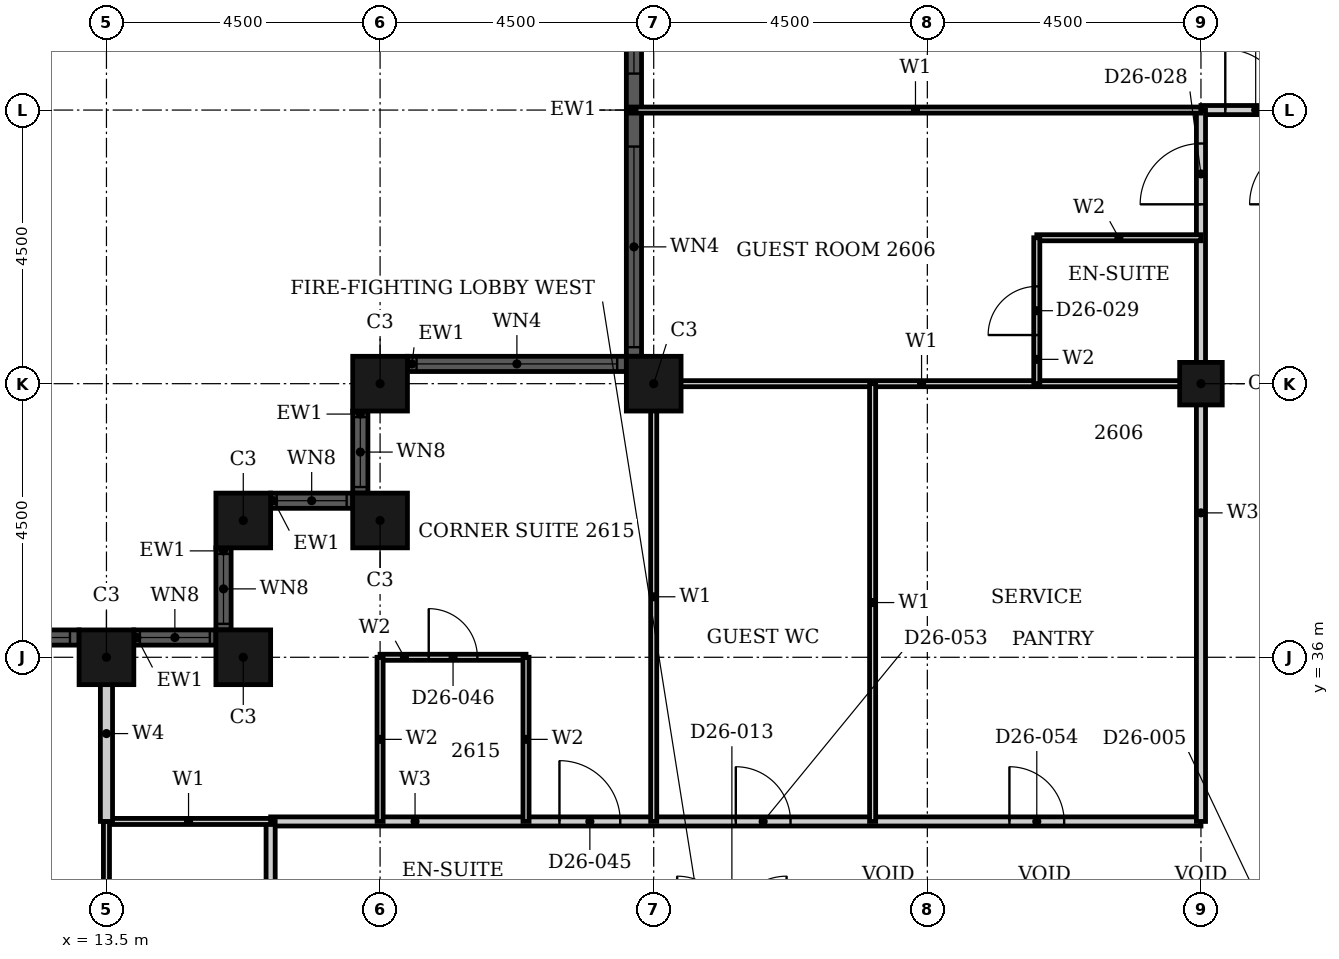
"""IFC4 building model, lengths in metres.
Left out: names, types, materials, properties, quantities, classifications, styles, units other than length and angle.
Written with IfcOpenShell. Run it as: python <this file> out.ifc"""

import sys

from ifc_helpers import new_model, si_unit, direction, frame, frame_2d, origin, origin_2d, place, context, subcontext, project, spatial, rectangle, hollow_rectangle, extrude, element, fill, save


model = new_model("IFC4")
c1 = context("Model", 3, precision=1e-05, world=origin(), true_north=direction((0.0, 1.0)))
c2 = subcontext(c1, "Body", "Model", "MODEL_VIEW")
j1 = project(units=[si_unit("LENGTHUNIT", "METRE"), si_unit("PLANEANGLEUNIT", "RADIAN")], contexts=[c1])
p1 = place(None, origin())
s1 = spatial("IfcSite", under=j1, at=p1, CompositionType="ELEMENT")
p2 = place(p1, origin())
s2 = spatial("IfcBuilding", under=s1, at=p2, CompositionType="ELEMENT")
p3 = place(p2, frame((0.0, 0.0, 108.0)))
s3 = spatial("IfcBuildingStorey", under=s2, at=p3, CompositionType="ELEMENT", Elevation=108.0)
for number, where, z_axis, x_axis in (
    (1, (22.5, 40.5, 0.0), (0.0, 0.0, 1.0), (1.0, 0.0, 0.0)),
    (2, (18.0, 40.5, 0.0), (0.0, 0.0, 1.0), (1.0, 0.0, 0.0)),
    (3, (18.0, 38.25, 0.0), (0.0, 0.0, 1.0), (1.0, 0.0, 0.0)),
    (4, (15.75, 38.25, 0.0), (0.0, 0.0, 1.0), (1.0, 0.0, 0.0)),
    (5, (15.75, 36.0, 0.0), (0.0, 0.0, 1.0), (1.0, 0.0, 0.0)),
    (6, (13.5, 36.0, 0.0), (0.0, 0.0, 1.0), (1.0, 0.0, 0.0)),
):
    element("IfcColumn", number, at=place(p3, frame(where, z_axis=z_axis, x_axis=x_axis)), inside=s3, PredefinedType="COLUMN", context=c2, shape_type="SweptSolid", body=[
        extrude(hollow_rectangle(XDim=0.9, YDim=0.9, WallThickness=0.028, at=origin_2d()), origin(), (0.0, 0.0, 1.0), 3.6),
    ])
p4 = place(p3, frame((31.5, 40.5, 0.0), z_axis=(0.0, 0.0, 1.0), x_axis=(1.0, 0.0, 0.0)))
e7 = element("IfcColumn", 7, at=p4, inside=s3, PredefinedType="COLUMN", context=c2, shape_type="SweptSolid", body=[
    extrude(hollow_rectangle(XDim=0.7, YDim=0.7, WallThickness=0.022, at=origin_2d()), origin(), (0.0, 0.0, 1.0), 3.6),
])
p5 = place(p3, frame((22.175, 49.05, 0.0), z_axis=(0.0, 0.0, 1.0), x_axis=(0.0, -1.0, 0.0)))
e8 = element("IfcWall", 8, at=p5, inside=s3, PredefinedType="SOLIDWALL", context=c2, shape_type="SweptSolid", body=[
    extrude(rectangle(XDim=8.1, YDim=0.25, at=frame_2d((4.05, 0.0))), origin(), (0.0, 0.0, 1.0), 3.6),
])
p6 = place(p5, frame((0.15, 0.0, 0.9)))
e9 = element("IfcOpeningElement", 9, at=p6, cuts=e8, PredefinedType="OPENING", context=c2, shape_type="SweptSolid", body=[
    extrude(rectangle(XDim=3.3, YDim=2.08, at=frame_2d((1.65, 1.04))), frame((0.0, 0.135, 0.0), z_axis=(0.0, -1.0, 0.0), x_axis=(1.0, 0.0, 0.0)), (0.0, 0.0, 1.0), 0.27),
])
p7 = place(p5, frame((4.65, 0.0, 0.9)))
e10 = element("IfcOpeningElement", 10, at=p7, cuts=e8, PredefinedType="OPENING", context=c2, shape_type="SweptSolid", body=[
    extrude(rectangle(XDim=3.3, YDim=2.08, at=frame_2d((1.65, 1.04))), frame((0.0, 0.135, 0.0), z_axis=(0.0, -1.0, 0.0), x_axis=(1.0, 0.0, 0.0)), (0.0, 0.0, 1.0), 0.27),
])
p8 = place(p3, frame((22.05, 40.825, 0.0), z_axis=(0.0, 0.0, 1.0), x_axis=(-1.0, 0.0, 0.0)))
e11 = element("IfcWall", 11, at=p8, inside=s3, PredefinedType="SOLIDWALL", context=c2, shape_type="SweptSolid", body=[
    extrude(rectangle(XDim=3.6, YDim=0.25, at=frame_2d((1.8, 0.0))), origin(), (0.0, 0.0, 1.0), 3.6),
])
p9 = place(p8, frame((0.15, 0.0, 0.9)))
e12 = element("IfcOpeningElement", 12, at=p9, cuts=e11, PredefinedType="OPENING", context=c2, shape_type="SweptSolid", body=[
    extrude(rectangle(XDim=3.3, YDim=2.08, at=frame_2d((1.65, 1.04))), frame((0.0, 0.135, 0.0), z_axis=(0.0, -1.0, 0.0), x_axis=(1.0, 0.0, 0.0)), (0.0, 0.0, 1.0), 0.27),
])
p10 = place(p3, frame((17.675, 40.05, 0.0), z_axis=(0.0, 0.0, 1.0), x_axis=(0.0, -1.0, 0.0)))
e13 = element("IfcWall", 13, at=p10, inside=s3, PredefinedType="SOLIDWALL", context=c2, shape_type="SweptSolid", body=[
    extrude(rectangle(XDim=1.35, YDim=0.25, at=frame_2d((0.675, 0.0))), origin(), (0.0, 0.0, 1.0), 3.6),
])
p11 = place(p10, frame((0.1, 0.0, 0.9)))
e14 = element("IfcOpeningElement", 14, at=p11, cuts=e13, PredefinedType="OPENING", context=c2, shape_type="SweptSolid", body=[
    extrude(rectangle(XDim=1.15, YDim=2.08, at=frame_2d((0.575, 1.04))), frame((0.0, 0.135, 0.0), z_axis=(0.0, -1.0, 0.0), x_axis=(1.0, 0.0, 0.0)), (0.0, 0.0, 1.0), 0.27),
])
p12 = place(p3, frame((17.55, 38.575, 0.0), z_axis=(0.0, 0.0, 1.0), x_axis=(-1.0, 0.0, 0.0)))
e15 = element("IfcWall", 15, at=p12, inside=s3, PredefinedType="SOLIDWALL", context=c2, shape_type="SweptSolid", body=[
    extrude(rectangle(XDim=1.35, YDim=0.25, at=frame_2d((0.675, 0.0))), origin(), (0.0, 0.0, 1.0), 3.6),
])
p13 = place(p12, frame((0.1, 0.0, 0.9)))
e16 = element("IfcOpeningElement", 16, at=p13, cuts=e15, PredefinedType="OPENING", context=c2, shape_type="SweptSolid", body=[
    extrude(rectangle(XDim=1.15, YDim=2.08, at=frame_2d((0.575, 1.04))), frame((0.0, 0.135, 0.0), z_axis=(0.0, -1.0, 0.0), x_axis=(1.0, 0.0, 0.0)), (0.0, 0.0, 1.0), 0.27),
])
p14 = place(p3, frame((15.425, 37.8, 0.0), z_axis=(0.0, 0.0, 1.0), x_axis=(0.0, -1.0, 0.0)))
e17 = element("IfcWall", 17, at=p14, inside=s3, PredefinedType="SOLIDWALL", context=c2, shape_type="SweptSolid", body=[
    extrude(rectangle(XDim=1.35, YDim=0.25, at=frame_2d((0.675, 0.0))), origin(), (0.0, 0.0, 1.0), 3.6),
])
p15 = place(p14, frame((0.1, 0.0, 0.9)))
e18 = element("IfcOpeningElement", 18, at=p15, cuts=e17, PredefinedType="OPENING", context=c2, shape_type="SweptSolid", body=[
    extrude(rectangle(XDim=1.15, YDim=2.08, at=frame_2d((0.575, 1.04))), frame((0.0, 0.135, 0.0), z_axis=(0.0, -1.0, 0.0), x_axis=(1.0, 0.0, 0.0)), (0.0, 0.0, 1.0), 0.27),
])
p16 = place(p3, frame((15.3, 36.325, 0.0), z_axis=(0.0, 0.0, 1.0), x_axis=(-1.0, 0.0, 0.0)))
e19 = element("IfcWall", 19, at=p16, inside=s3, PredefinedType="SOLIDWALL", context=c2, shape_type="SweptSolid", body=[
    extrude(rectangle(XDim=1.35, YDim=0.25, at=frame_2d((0.675, 0.0))), origin(), (0.0, 0.0, 1.0), 3.6),
])
p17 = place(p16, frame((0.1, 0.0, 0.9)))
e20 = element("IfcOpeningElement", 20, at=p17, cuts=e19, PredefinedType="OPENING", context=c2, shape_type="SweptSolid", body=[
    extrude(rectangle(XDim=1.15, YDim=2.08, at=frame_2d((0.575, 1.04))), frame((0.0, 0.135, 0.0), z_axis=(0.0, -1.0, 0.0), x_axis=(1.0, 0.0, 0.0)), (0.0, 0.0, 1.0), 0.27),
])
p18 = place(p3, frame((13.05, 36.325, 0.0), z_axis=(0.0, 0.0, 1.0), x_axis=(-1.0, 0.0, 0.0)))
e21 = element("IfcWall", 21, at=p18, inside=s3, PredefinedType="SOLIDWALL", context=c2, shape_type="SweptSolid", body=[
    extrude(rectangle(XDim=8.1, YDim=0.25, at=frame_2d((4.05, 0.0))), origin(), (0.0, 0.0, 1.0), 3.6),
])
p19 = place(p18, frame((0.15, 0.0, 0.9)))
e22 = element("IfcOpeningElement", 22, at=p19, cuts=e21, PredefinedType="OPENING", context=c2, shape_type="SweptSolid", body=[
    extrude(rectangle(XDim=3.3, YDim=2.08, at=frame_2d((1.65, 1.04))), frame((0.0, 0.135, 0.0), z_axis=(0.0, -1.0, 0.0), x_axis=(1.0, 0.0, 0.0)), (0.0, 0.0, 1.0), 0.27),
])
p20 = place(p18, frame((4.65, 0.0, 0.9)))
e23 = element("IfcOpeningElement", 23, at=p20, cuts=e21, PredefinedType="OPENING", context=c2, shape_type="SweptSolid", body=[
    extrude(rectangle(XDim=3.3, YDim=2.08, at=frame_2d((1.65, 1.04))), frame((0.0, 0.135, 0.0), z_axis=(0.0, -1.0, 0.0), x_axis=(1.0, 0.0, 0.0)), (0.0, 0.0, 1.0), 0.27),
])
p21 = place(p3, frame((16.2, 33.3, 0.0), z_axis=(0.0, 0.0, 1.0), x_axis=(1.0, 0.0, 0.0)))
e24 = element("IfcWall", 24, at=p21, inside=s3, PredefinedType="PARTITIONING", context=c2, shape_type="SweptSolid", body=[
    extrude(rectangle(XDim=15.3, YDim=0.15, at=frame_2d((7.65, 0.0))), origin(), (0.0, 0.0, 1.0), 3.3),
])
p22 = place(p21, frame((4.75, 0.0, 0.0)))
e25 = element("IfcOpeningElement", 25, at=p22, cuts=e24, PredefinedType="OPENING", context=c2, shape_type="SweptSolid", body=[
    extrude(rectangle(XDim=1.0, YDim=2.1, at=frame_2d((0.5, 1.05))), frame((0.0, 0.085, 0.0), z_axis=(0.0, -1.0, 0.0), x_axis=(1.0, 0.0, 0.0)), (0.0, 0.0, 1.0), 0.17),
])
p23 = place(p21, frame((7.65, 0.0, 0.0)))
e26 = element("IfcOpeningElement", 26, at=p23, cuts=e24, PredefinedType="OPENING", context=c2, shape_type="SweptSolid", body=[
    extrude(rectangle(XDim=0.9, YDim=2.1, at=frame_2d((0.45, 1.05))), frame((0.0, 0.085, 0.0), z_axis=(0.0, -1.0, 0.0), x_axis=(1.0, 0.0, 0.0)), (0.0, 0.0, 1.0), 0.17),
])
p24 = place(p21, frame((12.15, 0.0, 0.0)))
e27 = element("IfcOpeningElement", 27, at=p24, cuts=e24, PredefinedType="OPENING", context=c2, shape_type="SweptSolid", body=[
    extrude(rectangle(XDim=0.9, YDim=2.1, at=frame_2d((0.45, 1.05))), frame((0.0, 0.085, 0.0), z_axis=(0.0, -1.0, 0.0), x_axis=(1.0, 0.0, 0.0)), (0.0, 0.0, 1.0), 0.17),
])
p25 = place(p3, frame((31.5, 45.0, 0.0), z_axis=(0.0, 0.0, 1.0), x_axis=(1.0, 0.0, 0.0)))
e28 = element("IfcWall", 28, at=p25, inside=s3, PredefinedType="PARTITIONING", context=c2, shape_type="SweptSolid", body=[
    extrude(rectangle(XDim=1.8, YDim=0.15, at=frame_2d((0.9, 0.0))), origin(), (0.0, 0.0, 1.0), 3.3),
])
p26 = place(p25, frame((0.4, 0.0, 0.0)))
e29 = element("IfcOpeningElement", 29, at=p26, cuts=e28, PredefinedType="OPENING", context=c2, shape_type="SweptSolid", body=[
    extrude(rectangle(XDim=1.0, YDim=2.1, at=frame_2d((0.5, 1.05))), frame((0.0, 0.085, 0.0), z_axis=(0.0, -1.0, 0.0), x_axis=(1.0, 0.0, 0.0)), (0.0, 0.0, 1.0), 0.17),
])
p27 = place(p3, frame((16.2, 27.0, 0.0), z_axis=(0.0, 0.0, 1.0), x_axis=(0.0, 1.0, 0.0)))
e30 = element("IfcWall", 30, at=p27, inside=s3, PredefinedType="PARTITIONING", context=c2, shape_type="SweptSolid", body=[
    extrude(rectangle(XDim=6.3, YDim=0.15, at=frame_2d((3.15, 0.0))), origin(), (0.0, 0.0, 1.0), 3.3),
])
p28 = place(p27, frame((2.55, 0.0, 0.0)))
e31 = element("IfcOpeningElement", 31, at=p28, cuts=e30, PredefinedType="OPENING", context=c2, shape_type="SweptSolid", body=[
    extrude(rectangle(XDim=0.9, YDim=2.1, at=frame_2d((0.45, 1.05))), frame((0.0, 0.085, 0.0), z_axis=(0.0, -1.0, 0.0), x_axis=(1.0, 0.0, 0.0)), (0.0, 0.0, 1.0), 0.17),
])
p29 = place(p3, frame((31.5, 33.3, 0.0), z_axis=(0.0, 0.0, 1.0), x_axis=(0.0, 1.0, 0.0)))
e32 = element("IfcWall", 32, at=p29, inside=s3, PredefinedType="PARTITIONING", context=c2, shape_type="SweptSolid", body=[
    extrude(rectangle(XDim=11.7, YDim=0.15, at=frame_2d((5.85, 0.0))), origin(), (0.0, 0.0, 1.0), 2.58),
])
p30 = place(p29, frame((10.15, 0.0, 0.0)))
e33 = element("IfcOpeningElement", 33, at=p30, cuts=e32, PredefinedType="OPENING", context=c2, shape_type="SweptSolid", body=[
    extrude(rectangle(XDim=1.0, YDim=2.1, at=frame_2d((0.5, 1.05))), frame((0.0, 0.085, 0.0), z_axis=(0.0, -1.0, 0.0), x_axis=(1.0, 0.0, 0.0)), (0.0, 0.0, 1.0), 0.17),
])
p31 = place(p3, frame((13.5, 33.3, 0.0), z_axis=(0.0, 0.0, 1.0), x_axis=(1.0, 0.0, 0.0)))
e34 = element("IfcWall", 34, at=p31, inside=s3, PredefinedType="PARTITIONING", context=c2, shape_type="SweptSolid", body=[
    extrude(rectangle(XDim=2.7, YDim=0.1, at=frame_2d((1.35, 0.0))), origin(), (0.0, 0.0, 1.0), 3.3),
])
p32 = place(p3, frame((22.31, 40.5, 0.0), z_axis=(0.0, 0.0, 1.0), x_axis=(1.0, 0.0, 0.0)))
e35 = element("IfcWall", 35, at=p32, inside=s3, PredefinedType="PARTITIONING", context=c2, shape_type="SweptSolid", body=[
    extrude(rectangle(XDim=9.19, YDim=0.1, at=frame_2d((4.595, 0.0))), origin(), (0.0, 0.0, 1.0), 2.38),
])
p33 = place(p3, frame((22.11, 45.0, 0.0), z_axis=(0.0, 0.0, 1.0), x_axis=(1.0, 0.0, 0.0)))
e36 = element("IfcWall", 36, at=p33, inside=s3, PredefinedType="PARTITIONING", context=c2, shape_type="SweptSolid", body=[
    extrude(rectangle(XDim=9.39, YDim=0.1, at=frame_2d((4.695, 0.0))), origin(), (0.0, 0.0, 1.0), 3.3),
])
p34 = place(p3, frame((13.5, 27.0, 0.0), z_axis=(0.0, 0.0, 1.0), x_axis=(0.0, 1.0, 0.0)))
e37 = element("IfcWall", 37, at=p34, inside=s3, PredefinedType="PARTITIONING", context=c2, shape_type="SweptSolid", body=[
    extrude(rectangle(XDim=6.3, YDim=0.1, at=frame_2d((3.15, 0.0))), origin(), (0.0, 0.0, 1.0), 2.38),
])
p35 = place(p3, frame((22.5, 33.3, 0.0), z_axis=(0.0, 0.0, 1.0), x_axis=(0.0, 1.0, 0.0)))
e38 = element("IfcWall", 38, at=p35, inside=s3, PredefinedType="PARTITIONING", context=c2, shape_type="SweptSolid", body=[
    extrude(rectangle(XDim=7.39, YDim=0.1, at=frame_2d((3.695, 0.0))), origin(), (0.0, 0.0, 1.0), 3.3),
])
p36 = place(p3, frame((26.1, 33.3, 0.0), z_axis=(0.0, 0.0, 1.0), x_axis=(0.0, 1.0, 0.0)))
e39 = element("IfcWall", 39, at=p36, inside=s3, PredefinedType="PARTITIONING", context=c2, shape_type="SweptSolid", body=[
    extrude(rectangle(XDim=7.2, YDim=0.1, at=frame_2d((3.6, 0.0))), origin(), (0.0, 0.0, 1.0), 3.3),
])
p37 = place(p3, frame((13.5, 33.3, 0.0), z_axis=(0.0, 0.0, 1.0), x_axis=(0.0, 1.0, 0.0)))
e40 = element("IfcWall", 40, at=p37, inside=s3, PredefinedType="PARTITIONING", context=c2, shape_type="SweptSolid", body=[
    extrude(rectangle(XDim=2.89, YDim=0.2, at=frame_2d((1.445, 0.0))), origin(), (0.0, 0.0, 1.0), 2.38),
])
p38 = place(p3, frame((18.0, 36.0, 0.0), z_axis=(0.0, 0.0, 1.0), x_axis=(1.0, 0.0, 0.0)))
e41 = element("IfcWall", 41, at=p38, inside=s3, PredefinedType="PARTITIONING", context=c2, shape_type="SweptSolid", body=[
    extrude(rectangle(XDim=2.4, YDim=0.1, at=frame_2d((1.2, 0.0))), origin(), (0.0, 0.0, 1.0), 3.3),
])
p39 = place(p38, frame((0.8, 0.0, 0.0)))
e42 = element("IfcOpeningElement", 42, at=p39, cuts=e41, PredefinedType="OPENING", context=c2, shape_type="SweptSolid", body=[
    extrude(rectangle(XDim=0.8, YDim=2.1, at=frame_2d((0.4, 1.05))), frame((0.0, 0.06, 0.0), z_axis=(0.0, -1.0, 0.0), x_axis=(1.0, 0.0, 0.0)), (0.0, 0.0, 1.0), 0.12),
])
for number, where, z_axis, x_axis in (
    (43, (28.8, 42.9, 0.0), (0.0, 0.0, 1.0), (1.0, 0.0, 0.0)),
    (44, (18.0, 33.3, 0.0), (0.0, 0.0, 1.0), (0.0, 1.0, 0.0)),
    (45, (20.4, 33.3, 0.0), (0.0, 0.0, 1.0), (0.0, 1.0, 0.0)),
):
    element("IfcWall", number, at=place(p3, frame(where, z_axis=z_axis, x_axis=x_axis)), inside=s3, PredefinedType="PARTITIONING", context=c2, shape_type="SweptSolid", body=[
        extrude(rectangle(XDim=2.7, YDim=0.1, at=frame_2d((1.35, 0.0))), origin(), (0.0, 0.0, 1.0), 3.3),
    ])
p40 = place(p3, frame((28.8, 40.5, 0.0), z_axis=(0.0, 0.0, 1.0), x_axis=(0.0, 1.0, 0.0)))
e46 = element("IfcWall", 46, at=p40, inside=s3, PredefinedType="PARTITIONING", context=c2, shape_type="SweptSolid", body=[
    extrude(rectangle(XDim=2.4, YDim=0.1, at=frame_2d((1.2, 0.0))), origin(), (0.0, 0.0, 1.0), 3.3),
])
p41 = place(p40, frame((0.8, 0.0, 0.0)))
e47 = element("IfcOpeningElement", 47, at=p41, cuts=e46, PredefinedType="OPENING", context=c2, shape_type="SweptSolid", body=[
    extrude(rectangle(XDim=0.8, YDim=2.1, at=frame_2d((0.4, 1.05))), frame((0.0, 0.06, 0.0), z_axis=(0.0, -1.0, 0.0), x_axis=(1.0, 0.0, 0.0)), (0.0, 0.0, 1.0), 0.12),
])
p42 = place(p6, origin())
e48 = element("IfcWindow", 48, at=p42, inside=s3, PartitioningType="SINGLE_PANEL", PredefinedType="WINDOW", context=c2, shape_type="SweptSolid", body=[
    extrude(rectangle(XDim=3.3, YDim=2.08, at=frame_2d((1.65, 1.04))), frame((0.0, 0.03, 0.0), z_axis=(0.0, -1.0, 0.0), x_axis=(1.0, 0.0, 0.0)), (0.0, 0.0, 1.0), 0.06),
])
fill(e9, e48)
p43 = place(p7, origin())
e49 = element("IfcWindow", 49, at=p43, inside=s3, PartitioningType="SINGLE_PANEL", PredefinedType="WINDOW", context=c2, shape_type="SweptSolid", body=[
    extrude(rectangle(XDim=3.3, YDim=2.08, at=frame_2d((1.65, 1.04))), frame((0.0, 0.03, 0.0), z_axis=(0.0, -1.0, 0.0), x_axis=(1.0, 0.0, 0.0)), (0.0, 0.0, 1.0), 0.06),
])
fill(e10, e49)
p44 = place(p9, origin())
e50 = element("IfcWindow", 50, at=p44, inside=s3, PartitioningType="SINGLE_PANEL", PredefinedType="WINDOW", context=c2, shape_type="SweptSolid", body=[
    extrude(rectangle(XDim=3.3, YDim=2.08, at=frame_2d((1.65, 1.04))), frame((0.0, 0.03, 0.0), z_axis=(0.0, -1.0, 0.0), x_axis=(1.0, 0.0, 0.0)), (0.0, 0.0, 1.0), 0.06),
])
fill(e12, e50)
p45 = place(p11, origin())
e51 = element("IfcWindow", 51, at=p45, inside=s3, PartitioningType="SINGLE_PANEL", PredefinedType="WINDOW", context=c2, shape_type="SweptSolid", body=[
    extrude(rectangle(XDim=1.15, YDim=2.08, at=frame_2d((0.575, 1.04))), frame((0.0, 0.03, 0.0), z_axis=(0.0, -1.0, 0.0), x_axis=(1.0, 0.0, 0.0)), (0.0, 0.0, 1.0), 0.06),
])
fill(e14, e51)
p46 = place(p13, origin())
e52 = element("IfcWindow", 52, at=p46, inside=s3, PartitioningType="SINGLE_PANEL", PredefinedType="WINDOW", context=c2, shape_type="SweptSolid", body=[
    extrude(rectangle(XDim=1.15, YDim=2.08, at=frame_2d((0.575, 1.04))), frame((0.0, 0.03, 0.0), z_axis=(0.0, -1.0, 0.0), x_axis=(1.0, 0.0, 0.0)), (0.0, 0.0, 1.0), 0.06),
])
fill(e16, e52)
p47 = place(p15, origin())
e53 = element("IfcWindow", 53, at=p47, inside=s3, PartitioningType="SINGLE_PANEL", PredefinedType="WINDOW", context=c2, shape_type="SweptSolid", body=[
    extrude(rectangle(XDim=1.15, YDim=2.08, at=frame_2d((0.575, 1.04))), frame((0.0, 0.03, 0.0), z_axis=(0.0, -1.0, 0.0), x_axis=(1.0, 0.0, 0.0)), (0.0, 0.0, 1.0), 0.06),
])
fill(e18, e53)
p48 = place(p17, origin())
e54 = element("IfcWindow", 54, at=p48, inside=s3, PartitioningType="SINGLE_PANEL", PredefinedType="WINDOW", context=c2, shape_type="SweptSolid", body=[
    extrude(rectangle(XDim=1.15, YDim=2.08, at=frame_2d((0.575, 1.04))), frame((0.0, 0.03, 0.0), z_axis=(0.0, -1.0, 0.0), x_axis=(1.0, 0.0, 0.0)), (0.0, 0.0, 1.0), 0.06),
])
fill(e20, e54)
p49 = place(p19, origin())
e55 = element("IfcWindow", 55, at=p49, inside=s3, PartitioningType="SINGLE_PANEL", PredefinedType="WINDOW", context=c2, shape_type="SweptSolid", body=[
    extrude(rectangle(XDim=3.3, YDim=2.08, at=frame_2d((1.65, 1.04))), frame((0.0, 0.03, 0.0), z_axis=(0.0, -1.0, 0.0), x_axis=(1.0, 0.0, 0.0)), (0.0, 0.0, 1.0), 0.06),
])
fill(e22, e55)
p50 = place(p30, origin())
e56 = element("IfcDoor", 56, at=p50, inside=s3, OperationType="SINGLE_SWING_RIGHT", PredefinedType="DOOR", context=c2, shape_type="SweptSolid", body=[
    extrude(rectangle(XDim=1.0, YDim=2.1, at=frame_2d((0.5, 1.05))), frame((0.0, 0.025, 0.0), z_axis=(0.0, -1.0, 0.0), x_axis=(1.0, 0.0, 0.0)), (0.0, 0.0, 1.0), 0.05),
])
fill(e33, e56)
p51 = place(p41, origin())
e57 = element("IfcDoor", 57, at=p51, inside=s3, OperationType="SINGLE_SWING_LEFT", PredefinedType="DOOR", context=c2, shape_type="SweptSolid", body=[
    extrude(rectangle(XDim=0.8, YDim=2.1, at=frame_2d((0.4, 1.05))), frame((0.0, 0.025, 0.0), z_axis=(0.0, -1.0, 0.0), x_axis=(1.0, 0.0, 0.0)), (0.0, 0.0, 1.0), 0.05),
])
fill(e47, e57)
p52 = place(p26, origin())
e58 = element("IfcDoor", 58, at=p52, inside=s3, OperationType="SINGLE_SWING_LEFT", PredefinedType="DOOR", context=c2, shape_type="SweptSolid", body=[
    extrude(rectangle(XDim=1.0, YDim=2.1, at=frame_2d((0.5, 1.05))), frame((0.0, 0.025, 0.0), z_axis=(0.0, -1.0, 0.0), x_axis=(1.0, 0.0, 0.0)), (0.0, 0.0, 1.0), 0.05),
])
fill(e29, e58)
p53 = place(p22, origin())
e59 = element("IfcDoor", 59, at=p53, inside=s3, OperationType="SINGLE_SWING_RIGHT", PredefinedType="DOOR", context=c2, shape_type="SweptSolid", body=[
    extrude(rectangle(XDim=1.0, YDim=2.1, at=frame_2d((0.5, 1.05))), frame((0.0, 0.025, 0.0), z_axis=(0.0, -1.0, 0.0), x_axis=(1.0, 0.0, 0.0)), (0.0, 0.0, 1.0), 0.05),
])
fill(e25, e59)
p54 = place(p39, origin())
e60 = element("IfcDoor", 60, at=p54, inside=s3, OperationType="SINGLE_SWING_RIGHT", PredefinedType="DOOR", context=c2, shape_type="SweptSolid", body=[
    extrude(rectangle(XDim=0.8, YDim=2.1, at=frame_2d((0.4, 1.05))), frame((0.0, 0.025, 0.0), z_axis=(0.0, -1.0, 0.0), x_axis=(1.0, 0.0, 0.0)), (0.0, 0.0, 1.0), 0.05),
])
fill(e42, e60)
p55 = place(p23, origin())
e61 = element("IfcDoor", 61, at=p55, inside=s3, OperationType="SINGLE_SWING_LEFT", PredefinedType="DOOR", context=c2, shape_type="SweptSolid", body=[
    extrude(rectangle(XDim=0.9, YDim=2.1, at=frame_2d((0.45, 1.05))), frame((0.0, 0.025, 0.0), z_axis=(0.0, -1.0, 0.0), x_axis=(1.0, 0.0, 0.0)), (0.0, 0.0, 1.0), 0.05),
])
fill(e26, e61)
p56 = place(p24, origin())
e62 = element("IfcDoor", 62, at=p56, inside=s3, OperationType="SINGLE_SWING_RIGHT", PredefinedType="DOOR", context=c2, shape_type="SweptSolid", body=[
    extrude(rectangle(XDim=0.9, YDim=2.1, at=frame_2d((0.45, 1.05))), frame((0.0, 0.025, 0.0), z_axis=(0.0, -1.0, 0.0), x_axis=(1.0, 0.0, 0.0)), (0.0, 0.0, 1.0), 0.05),
])
fill(e27, e62)
save(model, sys.argv[1])
